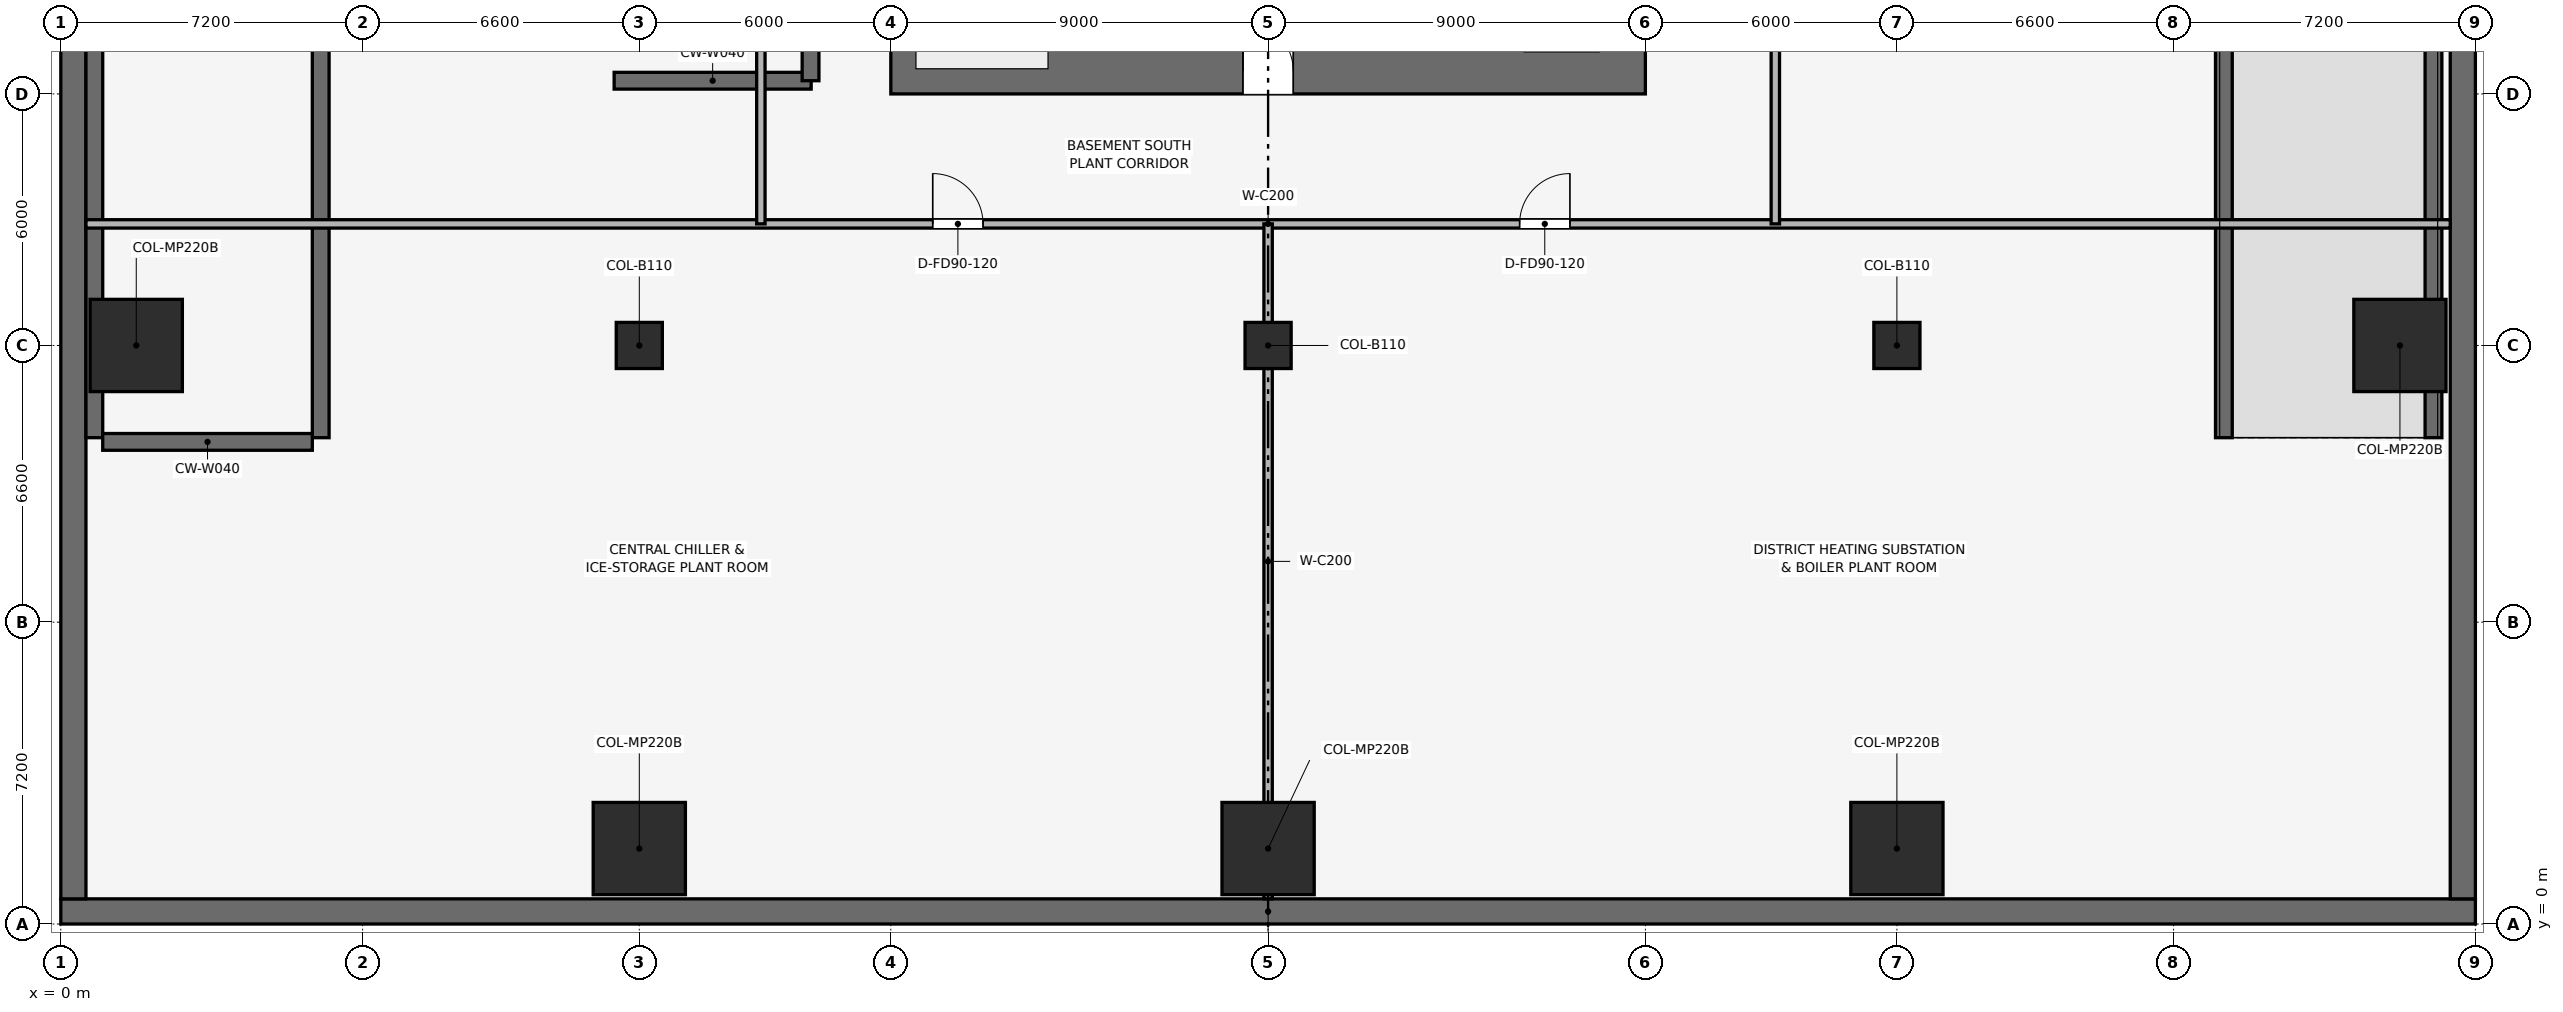
"""IFC4 building model, lengths in metres.
Left out: names, types, materials, properties, quantities, classifications, styles, units other than length and angle.
Written with IfcOpenShell. Run it as: python <this file> out.ifc"""

import sys

from ifc_helpers import new_model, si_unit, direction, frame, frame_2d, origin, origin_2d, place, context, subcontext, project, spatial, rectangle, extrude, element, fill, save


model = new_model("IFC4")
c1 = context("Model", 3, precision=1e-05, world=origin(), true_north=direction((0.0, 1.0)))
c2 = subcontext(c1, "Body", "Model", "MODEL_VIEW")
j1 = project(units=[si_unit("LENGTHUNIT", "METRE"), si_unit("PLANEANGLEUNIT", "RADIAN")], contexts=[c1])
p1 = place(None, origin())
s1 = spatial("IfcSite", under=j1, at=p1, CompositionType="ELEMENT")
p2 = place(p1, origin())
s2 = spatial("IfcBuilding", under=s1, at=p2, CompositionType="ELEMENT")
p3 = place(p2, frame((0.0, 0.0, -9.6)))
s3 = spatial("IfcBuildingStorey", under=s2, at=p3, CompositionType="ELEMENT", Elevation=-9.6)
p4 = place(p3, frame((0.0, 0.3, 0.0), z_axis=(0.0, 0.0, 1.0), x_axis=(1.0, 0.0, 0.0)))
e1 = element("IfcWall", 1, at=p4, inside=s3, PredefinedType="SOLIDWALL", context=c2, shape_type="SweptSolid", body=[
    extrude(rectangle(XDim=57.6, YDim=0.6, at=frame_2d((28.8, 0.0))), origin(), (0.0, 0.0, 1.0), 4.8),
])
for number, where, z_axis, x_axis in (
    (2, (0.3, 0.6, 0.0), (0.0, 0.0, 1.0), (0.0, 1.0, 0.0)),
    (3, (57.3, 0.6, 0.0), (0.0, 0.0, 1.0), (0.0, 1.0, 0.0)),
):
    element("IfcWall", number, at=place(p3, frame(where, z_axis=z_axis, x_axis=x_axis)), inside=s3, PredefinedType="SOLIDWALL", context=c2, shape_type="SweptSolid", body=[
        extrude(rectangle(XDim=56.4, YDim=0.6, at=frame_2d((28.2, 0.0))), origin(), (0.0, 0.0, 1.0), 4.8),
    ])
p5 = place(p3, frame((19.8, 20.35, 0.0), z_axis=(0.0, 0.0, 1.0), x_axis=(1.0, 0.0, 0.0)))
e4 = element("IfcWall", 4, at=p5, inside=s3, PredefinedType="SHEAR", context=c2, shape_type="SweptSolid", body=[
    extrude(rectangle(XDim=18.0, YDim=1.1, at=frame_2d((9.0, 0.0))), origin(), (0.0, 0.0, 1.0), 4.8),
])
p6 = place(p5, frame((8.4, 0.0, 0.0)))
e5 = element("IfcOpeningElement", 5, at=p6, cuts=e4, PredefinedType="OPENING", context=c2, shape_type="SweptSolid", body=[
    extrude(rectangle(XDim=1.2, YDim=2.2, at=frame_2d((0.6, 1.1))), frame((0.0, 0.56, 0.0), z_axis=(0.0, -1.0, 0.0), x_axis=(1.0, 0.0, 0.0)), (0.0, 0.0, 1.0), 1.12),
])
for number, where, z_axis, x_axis in (
    (6, (13.8, 1.8, 0.0), (0.0, 0.0, 1.0), (1.0, 0.0, 0.0)),
    (7, (28.8, 1.8, 0.0), (0.0, 0.0, 1.0), (1.0, 0.0, 0.0)),
    (8, (43.8, 1.8, 0.0), (0.0, 0.0, 1.0), (1.0, 0.0, 0.0)),
    (9, (55.8, 13.8, 0.0), (0.0, 0.0, 1.0), (1.0, 0.0, 0.0)),
    (10, (1.8, 13.8, 0.0), (0.0, 0.0, 1.0), (1.0, 0.0, 0.0)),
):
    element("IfcColumn", number, at=place(p3, frame(where, z_axis=z_axis, x_axis=x_axis)), inside=s3, PredefinedType="COLUMN", context=c2, shape_type="SweptSolid", body=[
        extrude(rectangle(XDim=2.2, YDim=2.2, at=origin_2d()), origin(), (0.0, 0.0, 1.0), 4.798),
    ])
for number, where, z_axis, x_axis in (
    (11, (13.8, 13.8, 0.0), (0.0, 0.0, 1.0), (1.0, 0.0, 0.0)),
    (12, (28.8, 13.8, 0.0), (0.0, 0.0, 1.0), (1.0, 0.0, 0.0)),
    (13, (43.8, 13.8, 0.0), (0.0, 0.0, 1.0), (1.0, 0.0, 0.0)),
):
    element("IfcColumn", number, at=place(p3, frame(where, z_axis=z_axis, x_axis=x_axis)), inside=s3, PredefinedType="COLUMN", context=c2, shape_type="SweptSolid", body=[
        extrude(rectangle(XDim=1.1, YDim=1.1, at=origin_2d()), origin(), (0.0, 0.0, 1.0), 4.798),
    ])
for number, where, z_axis, x_axis in (
    (14, (51.6, 11.6, 0.0), (0.0, 0.0, 1.0), (0.0, 1.0, 0.0)),
    (15, (56.6, 11.6, 0.0), (0.0, 0.0, 1.0), (0.0, 1.0, 0.0)),
):
    element("IfcWall", number, at=place(p3, frame(where, z_axis=z_axis, x_axis=x_axis)), inside=s3, PredefinedType="SHEAR", context=c2, shape_type="SweptSolid", body=[
        extrude(rectangle(XDim=29.2, YDim=0.4, at=frame_2d((14.6, 0.0))), origin(), (0.0, 0.0, 1.0), 4.45),
    ])
for number, where, z_axis, x_axis in (
    (16, (0.8, 11.6, 0.0), (0.0, 0.0, 1.0), (0.0, 1.0, 0.0)),
    (17, (6.2, 11.6, 0.0), (0.0, 0.0, 1.0), (0.0, 1.0, 0.0)),
):
    element("IfcWall", number, at=place(p3, frame(where, z_axis=z_axis, x_axis=x_axis)), inside=s3, PredefinedType="SHEAR", context=c2, shape_type="SweptSolid", body=[
        extrude(rectangle(XDim=29.4, YDim=0.4, at=frame_2d((14.7, 0.0))), origin(), (0.0, 0.0, 1.0), 4.45),
    ])
p7 = place(p3, frame((1.0, 11.5, 0.0), z_axis=(0.0, 0.0, 1.0), x_axis=(1.0, 0.0, 0.0)))
e18 = element("IfcWall", 18, at=p7, inside=s3, PredefinedType="SHEAR", context=c2, shape_type="SweptSolid", body=[
    extrude(rectangle(XDim=5.0, YDim=0.4, at=frame_2d((2.5, 0.0))), origin(), (0.0, 0.0, 1.0), 4.45),
])
p8 = place(p3, frame((13.2, 20.115, 0.0), z_axis=(0.0, 0.0, 1.0), x_axis=(1.0, 0.0, 0.0)))
e19 = element("IfcWall", 19, at=p8, inside=s3, PredefinedType="SHEAR", context=c2, shape_type="SweptSolid", body=[
    extrude(rectangle(XDim=4.7, YDim=0.4, at=frame_2d((2.35, 0.0))), origin(), (0.0, 0.0, 1.0), 4.448),
])
p9 = place(p3, frame((17.885, 20.115, 0.0), z_axis=(0.0, 0.0, 1.0), x_axis=(0.0, 1.0, 0.0)))
e20 = element("IfcWall", 20, at=p9, inside=s3, PredefinedType="SHEAR", context=c2, shape_type="SweptSolid", body=[
    extrude(rectangle(XDim=3.32, YDim=0.4, at=frame_2d((1.66, 0.0))), origin(), (0.0, 0.0, 1.0), 4.448),
])
p10 = place(p3, frame((0.6, 16.7, 0.0), z_axis=(0.0, 0.0, 1.0), x_axis=(1.0, 0.0, 0.0)))
e21 = element("IfcWall", 21, at=p10, inside=s3, PredefinedType="PARTITIONING", context=c2, shape_type="SweptSolid", body=[
    extrude(rectangle(XDim=56.4, YDim=0.2, at=frame_2d((28.2, 0.0))), origin(), (0.0, 0.0, 1.0), 3.035),
])
p11 = place(p10, frame((20.2, 0.0, 0.0)))
e22 = element("IfcOpeningElement", 22, at=p11, cuts=e21, PredefinedType="OPENING", context=c2, shape_type="SweptSolid", body=[
    extrude(rectangle(XDim=1.2, YDim=2.2, at=frame_2d((0.6, 1.1))), frame((0.0, 0.11, 0.0), z_axis=(0.0, -1.0, 0.0), x_axis=(1.0, 0.0, 0.0)), (0.0, 0.0, 1.0), 0.22),
])
p12 = place(p10, frame((34.2, 0.0, 0.0)))
e23 = element("IfcOpeningElement", 23, at=p12, cuts=e21, PredefinedType="OPENING", context=c2, shape_type="SweptSolid", body=[
    extrude(rectangle(XDim=1.2, YDim=2.2, at=frame_2d((0.6, 1.1))), frame((0.0, 0.11, 0.0), z_axis=(0.0, -1.0, 0.0), x_axis=(1.0, 0.0, 0.0)), (0.0, 0.0, 1.0), 0.22),
])
p13 = place(p3, frame((16.7, 16.7, 0.0), z_axis=(0.0, 0.0, 1.0), x_axis=(0.0, 1.0, 0.0)))
e24 = element("IfcWall", 24, at=p13, inside=s3, PredefinedType="PARTITIONING", context=c2, shape_type="SweptSolid", body=[
    extrude(rectangle(XDim=24.2, YDim=0.2, at=frame_2d((12.1, 0.0))), origin(), (0.0, 0.0, 1.0), 3.035),
])
p14 = place(p13, frame((9.2, 0.0, 0.0)))
e25 = element("IfcOpeningElement", 25, at=p14, cuts=e24, PredefinedType="OPENING", context=c2, shape_type="SweptSolid", body=[
    extrude(rectangle(XDim=1.2, YDim=2.2, at=frame_2d((0.6, 1.1))), frame((0.0, 0.11, 0.0), z_axis=(0.0, -1.0, 0.0), x_axis=(1.0, 0.0, 0.0)), (0.0, 0.0, 1.0), 0.22),
])
p15 = place(p3, frame((40.9, 16.7, 0.0), z_axis=(0.0, 0.0, 1.0), x_axis=(0.0, 1.0, 0.0)))
e26 = element("IfcWall", 26, at=p15, inside=s3, PredefinedType="PARTITIONING", context=c2, shape_type="SweptSolid", body=[
    extrude(rectangle(XDim=24.2, YDim=0.2, at=frame_2d((12.1, 0.0))), origin(), (0.0, 0.0, 1.0), 3.035),
])
p16 = place(p15, frame((9.2, 0.0, 0.0)))
e27 = element("IfcOpeningElement", 27, at=p16, cuts=e26, PredefinedType="OPENING", context=c2, shape_type="SweptSolid", body=[
    extrude(rectangle(XDim=1.2, YDim=2.2, at=frame_2d((0.6, 1.1))), frame((0.0, 0.11, 0.0), z_axis=(0.0, -1.0, 0.0), x_axis=(1.0, 0.0, 0.0)), (0.0, 0.0, 1.0), 0.22),
])
p17 = place(p3, frame((28.8, 0.6, 0.0), z_axis=(0.0, 0.0, 1.0), x_axis=(0.0, 1.0, 0.0)))
e28 = element("IfcWall", 28, at=p17, inside=s3, PredefinedType="PARTITIONING", context=c2, shape_type="SweptSolid", body=[
    extrude(rectangle(XDim=16.1, YDim=0.2, at=frame_2d((8.05, 0.0))), origin(), (0.0, 0.0, 1.0), 3.035),
])
p18 = place(p11, origin())
e29 = element("IfcDoor", 29, at=p18, inside=s3, OperationType="SINGLE_SWING_LEFT", PredefinedType="DOOR", context=c2, shape_type="SweptSolid", body=[
    extrude(rectangle(XDim=1.2, YDim=2.2, at=frame_2d((0.6, 1.1))), frame((0.0, 0.025, 0.0), z_axis=(0.0, -1.0, 0.0), x_axis=(1.0, 0.0, 0.0)), (0.0, 0.0, 1.0), 0.05),
])
fill(e22, e29)
p19 = place(p12, origin())
e30 = element("IfcDoor", 30, at=p19, inside=s3, OperationType="SINGLE_SWING_RIGHT", PredefinedType="DOOR", context=c2, shape_type="SweptSolid", body=[
    extrude(rectangle(XDim=1.2, YDim=2.2, at=frame_2d((0.6, 1.1))), frame((0.0, 0.025, 0.0), z_axis=(0.0, -1.0, 0.0), x_axis=(1.0, 0.0, 0.0)), (0.0, 0.0, 1.0), 0.05),
])
fill(e23, e30)
p20 = place(p6, origin())
e31 = element("IfcDoor", 31, at=p20, inside=s3, OperationType="SINGLE_SWING_LEFT", PredefinedType="DOOR", context=c2, shape_type="SweptSolid", body=[
    extrude(rectangle(XDim=1.2, YDim=2.2, at=frame_2d((0.6, 1.1))), frame((0.0, 0.025, 0.0), z_axis=(0.0, -1.0, 0.0), x_axis=(1.0, 0.0, 0.0)), (0.0, 0.0, 1.0), 0.05),
])
fill(e5, e31)
save(model, sys.argv[1])
